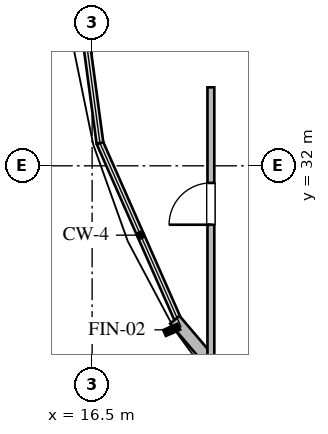
"""IFC4 building model, lengths in metres.
Left out: names, types, materials, properties, quantities, classifications, styles, units other than length and angle.
Written with IfcOpenShell. Run it as: python <this file> out.ifc"""

import sys

from ifc_helpers import new_model, si_unit, direction, frame, frame_2d, origin, place, context, subcontext, project, spatial, rectangle, extrude, element, fill, save


model = new_model("IFC4")
c1 = context("Model", 3, precision=1e-05, world=origin(), true_north=direction((0.0, 1.0)))
c2 = subcontext(c1, "Body", "Model", "MODEL_VIEW")
j1 = project(units=[si_unit("LENGTHUNIT", "METRE"), si_unit("PLANEANGLEUNIT", "RADIAN")], contexts=[c1])
p1 = place(None, origin())
s1 = spatial("IfcSite", under=j1, at=p1, CompositionType="ELEMENT")
p2 = place(p1, origin())
s2 = spatial("IfcBuilding", under=s1, at=p2, CompositionType="ELEMENT")
p3 = place(p2, frame((0.0, 0.0, 273.8)))
s3 = spatial("IfcBuildingStorey", under=s2, at=p3, CompositionType="ELEMENT", Elevation=273.8)
p4 = place(p3, frame((22.46, 23.506, 0.0), z_axis=(0.0, 0.0, 1.0), x_axis=(-0.648393724369, 0.761305180725, 0.0)))
e1 = element("IfcWall", 1, at=p4, inside=s3, PredefinedType="STANDARD", context=c2, shape_type="SweptSolid", body=[
    extrude(rectangle(XDim=5.836, YDim=0.32, at=frame_2d((2.918, 0.0))), origin(), (0.0, 0.0, 1.0), 2.7),
])
p5 = place(p3, frame((19.625, 26.845, 0.0), z_axis=(0.0, 0.0, 1.0), x_axis=(0.0, 1.0, 0.0)))
e2 = element("IfcWall", 2, at=p5, inside=s3, PredefinedType="PARTITIONING", context=c2, shape_type="SweptSolid", body=[
    extrude(rectangle(XDim=7.22, YDim=0.18, at=frame_2d((3.61, 0.0))), origin(), (0.0, 0.0, 1.0), 3.017),
])
p6 = place(p5, frame((3.605, 0.0, 0.0)))
e3 = element("IfcOpeningElement", 3, at=p6, cuts=e2, PredefinedType="OPENING", context=c2, shape_type="SweptSolid", body=[
    extrude(rectangle(XDim=1.1, YDim=2.1, at=frame_2d((0.55, 1.05))), frame((0.0, 0.1, 0.0), z_axis=(0.0, -1.0, 0.0), x_axis=(1.0, 0.0, 0.0)), (0.0, 0.0, 1.0), 0.2),
])
p7 = place(p6, origin())
e4 = element("IfcDoor", 4, at=p7, inside=s3, OperationType="SINGLE_SWING_LEFT", PredefinedType="DOOR", context=c2, shape_type="SweptSolid", body=[
    extrude(rectangle(XDim=1.1, YDim=2.1, at=frame_2d((0.55, 1.05))), frame((0.0, 0.025, 0.0), z_axis=(0.0, -1.0, 0.0), x_axis=(1.0, 0.0, 0.0)), (0.0, 0.0, 1.0), 0.05),
])
fill(e3, e4)
save(model, sys.argv[1])
